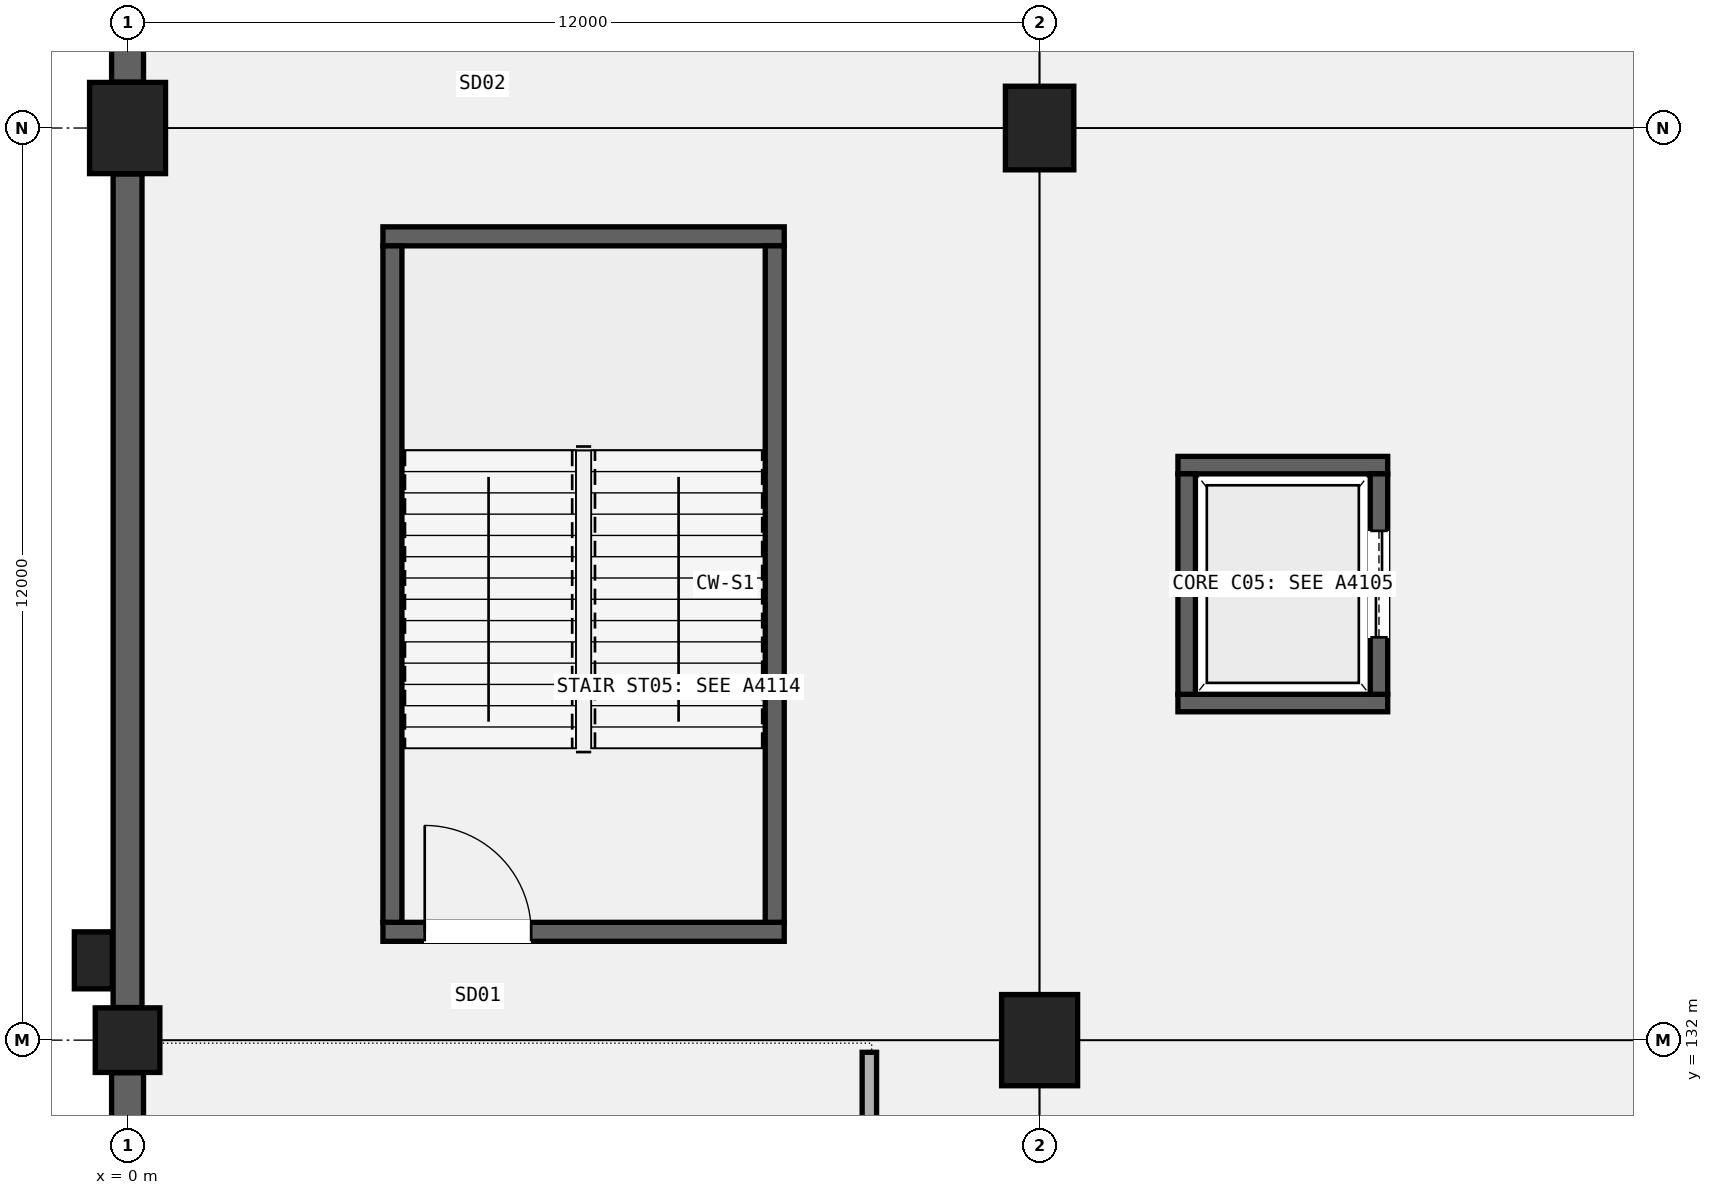
"""IFC4 building model, lengths in metres.
Left out: names, types, materials, properties, quantities, classifications, styles, units other than length and angle.
Written with IfcOpenShell. Run it as: python <this file> out.ifc"""

import sys

from ifc_helpers import new_model, si_unit, direction, frame, frame_2d, origin, origin_2d, place, context, subcontext, project, spatial, rectangle, circle, extrude, element, fill, save


model = new_model("IFC4")
c1 = context("Model", 3, precision=1e-05, world=origin(), true_north=direction((0.0, 1.0)))
c2 = subcontext(c1, "Body", "Model", "MODEL_VIEW")
j1 = project(units=[si_unit("LENGTHUNIT", "METRE"), si_unit("PLANEANGLEUNIT", "RADIAN")], contexts=[c1])
p1 = place(None, origin())
s1 = spatial("IfcSite", under=j1, at=p1, CompositionType="ELEMENT")
p2 = place(p1, origin())
s2 = spatial("IfcBuilding", under=s1, at=p2, CompositionType="ELEMENT")
p3 = place(p2, frame((0.0, 0.0, -4.8)))
s3 = spatial("IfcBuildingStorey", under=s2, at=p3, CompositionType="ELEMENT", Elevation=-4.8)
p4 = place(p3, frame((0.0, 132.0, 0.0), z_axis=(0.0, 0.0, 1.0), x_axis=(1.0, 0.0, 0.0)))
e1 = element("IfcColumn", 1, at=p4, inside=s3, PredefinedType="COLUMN", context=c2, shape_type="SweptSolid", body=[
    extrude(circle(Radius=0.425, at=origin_2d()), origin(), (0.0, 0.0, 1.0), 4.8),
])
for number, where, z_axis, x_axis in (
    (2, (0.0, 144.0, 0.0), (0.0, 0.0, 1.0), (1.0, 0.0, 0.0)),
    (3, (12.0, 132.0, 0.0), (0.0, 0.0, 1.0), (1.0, 0.0, 0.0)),
):
    element("IfcColumn", number, at=place(p3, frame(where, z_axis=z_axis, x_axis=x_axis)), inside=s3, PredefinedType="COLUMN", context=c2, shape_type="SweptSolid", body=[
        extrude(rectangle(XDim=1.0, YDim=1.2, at=origin_2d()), origin(), (0.0, 0.0, 1.0), 4.8),
    ])
p5 = place(p3, frame((12.0, 144.0, 0.0), z_axis=(0.0, 0.0, 1.0), x_axis=(1.0, 0.0, 0.0)))
e4 = element("IfcColumn", 4, at=p5, inside=s3, PredefinedType="COLUMN", context=c2, shape_type="SweptSolid", body=[
    extrude(rectangle(XDim=0.9, YDim=1.1, at=origin_2d()), origin(), (0.0, 0.0, 1.0), 4.8),
])
p6 = place(p3, frame((-0.45, 133.05, 0.0), z_axis=(0.0, 0.0, 1.0), x_axis=(1.0, 0.0, 0.0)))
e5 = element("IfcColumn", 5, at=p6, inside=s3, PredefinedType="PILASTER", context=c2, shape_type="SweptSolid", body=[
    extrude(rectangle(XDim=0.5, YDim=0.75, at=origin_2d()), origin(), (0.0, 0.0, 1.0), 4.8),
])
p7 = place(p3, frame((0.0, 120.504, 0.0), z_axis=(0.0, 0.0, 1.0), x_axis=(0.0, 1.0, 0.0)))
e6 = element("IfcWall", 6, at=p7, inside=s3, PredefinedType="STANDARD", context=c2, shape_type="SweptSolid", body=[
    extrude(rectangle(XDim=11.067, YDim=0.42, at=frame_2d((5.534, 0.0))), origin(), (0.0, 0.0, 1.0), 4.46),
])
p8 = place(p3, frame((0.0, 132.429, 0.0), z_axis=(0.0, 0.0, 1.0), x_axis=(0.0, 1.0, 0.0)))
e7 = element("IfcWall", 7, at=p8, inside=s3, PredefinedType="STANDARD", context=c2, shape_type="SweptSolid", body=[
    extrude(rectangle(XDim=10.967, YDim=0.38, at=frame_2d((5.483, 0.0))), origin(), (0.0, 0.0, 1.0), 4.46),
])
p9 = place(p3, frame((0.0, 144.604, 0.0), z_axis=(0.0, 0.0, 1.0), x_axis=(0.0, 1.0, 0.0)))
e8 = element("IfcWall", 8, at=p9, inside=s3, PredefinedType="STANDARD", context=c2, shape_type="SweptSolid", body=[
    extrude(rectangle(XDim=10.842, YDim=0.42, at=frame_2d((5.421, 0.0))), origin(), (0.0, 0.0, 1.0), 4.46),
])
p10 = place(p3, frame((3.36, 133.425, 0.0), z_axis=(0.0, 0.0, 1.0), x_axis=(1.0, 0.0, 0.0)))
e9 = element("IfcWall", 9, at=p10, inside=s3, PredefinedType="SHEAR", context=c2, shape_type="SweptSolid", body=[
    extrude(rectangle(XDim=5.28, YDim=0.25, at=frame_2d((2.64, 0.0))), origin(), (0.0, 0.0, 1.0), 4.5),
])
p11 = place(p10, frame((0.55, 0.0, 0.0)))
e10 = element("IfcOpeningElement", 10, at=p11, cuts=e9, PredefinedType="OPENING", context=c2, shape_type="SweptSolid", body=[
    extrude(rectangle(XDim=1.4, YDim=2.15, at=frame_2d((0.7, 1.075))), frame((0.0, 0.135, 0.0), z_axis=(0.0, -1.0, 0.0), x_axis=(1.0, 0.0, 0.0)), (0.0, 0.0, 1.0), 0.27),
])
p12 = place(p3, frame((3.36, 142.575, 0.0), z_axis=(0.0, 0.0, 1.0), x_axis=(1.0, 0.0, 0.0)))
e11 = element("IfcWall", 11, at=p12, inside=s3, PredefinedType="SHEAR", context=c2, shape_type="SweptSolid", body=[
    extrude(rectangle(XDim=5.28, YDim=0.25, at=frame_2d((2.64, 0.0))), origin(), (0.0, 0.0, 1.0), 4.5),
])
for number, where, z_axis, x_axis in (
    (12, (3.485, 133.55, 0.0), (0.0, 0.0, 1.0), (0.0, 1.0, 0.0)),
    (13, (8.515, 133.55, 0.0), (0.0, 0.0, 1.0), (0.0, 1.0, 0.0)),
):
    element("IfcWall", number, at=place(p3, frame(where, z_axis=z_axis, x_axis=x_axis)), inside=s3, PredefinedType="SHEAR", context=c2, shape_type="SweptSolid", body=[
        extrude(rectangle(XDim=8.9, YDim=0.25, at=frame_2d((4.45, 0.0))), origin(), (0.0, 0.0, 1.0), 4.5),
    ])
for number, where, z_axis, x_axis in (
    (14, (13.82, 136.435, -0.65), (0.0, 0.0, 1.0), (1.0, 0.0, 0.0)),
    (15, (13.82, 139.565, -0.65), (0.0, 0.0, 1.0), (1.0, 0.0, 0.0)),
):
    element("IfcWall", number, at=place(p3, frame(where, z_axis=z_axis, x_axis=x_axis)), inside=s3, PredefinedType="SHEAR", context=c2, shape_type="SweptSolid", body=[
        extrude(rectangle(XDim=2.76, YDim=0.23, at=frame_2d((1.38, 0.0))), origin(), (0.0, 0.0, 1.0), 4.5),
    ])
p13 = place(p3, frame((13.935, 136.55, -0.65), z_axis=(0.0, 0.0, 1.0), x_axis=(0.0, 1.0, 0.0)))
e16 = element("IfcWall", 16, at=p13, inside=s3, PredefinedType="SHEAR", context=c2, shape_type="SweptSolid", body=[
    extrude(rectangle(XDim=2.9, YDim=0.23, at=frame_2d((1.45, 0.0))), origin(), (0.0, 0.0, 1.0), 4.5),
])
p14 = place(p3, frame((16.465, 136.55, -0.65), z_axis=(0.0, 0.0, 1.0), x_axis=(0.0, 1.0, 0.0)))
e17 = element("IfcWall", 17, at=p14, inside=s3, PredefinedType="SHEAR", context=c2, shape_type="SweptSolid", body=[
    extrude(rectangle(XDim=2.9, YDim=0.23, at=frame_2d((1.45, 0.0))), origin(), (0.0, 0.0, 1.0), 4.5),
])
p15 = place(p14, frame((0.75, 0.0, 0.65)))
e18 = element("IfcOpeningElement", 18, at=p15, cuts=e17, PredefinedType="OPENING", context=c2, shape_type="SweptSolid", body=[
    extrude(rectangle(XDim=1.4, YDim=2.25, at=frame_2d((0.7, 1.125))), frame((0.0, 0.125, 0.0), z_axis=(0.0, -1.0, 0.0), x_axis=(1.0, 0.0, 0.0)), (0.0, 0.0, 1.0), 0.25),
])
p16 = place(p3, frame((9.76, 120.16, 0.0), z_axis=(0.0, 0.0, 1.0), x_axis=(0.0, 1.0, 0.0)))
e19 = element("IfcWall", 19, at=p16, inside=s3, PredefinedType="PARTITIONING", context=c2, shape_type="SweptSolid", body=[
    extrude(rectangle(XDim=11.68, YDim=0.19, at=frame_2d((5.84, 0.0))), origin(), (0.0, 0.0, 1.0), 3.92),
])
p17 = place(p16, frame((1.347, 0.0, 0.0)))
e20 = element("IfcOpeningElement", 20, at=p17, cuts=e19, PredefinedType="OPENING", context=c2, shape_type="SweptSolid", body=[
    extrude(rectangle(XDim=1.15, YDim=2.15, at=frame_2d((0.575, 1.075))), frame((0.0, 0.105, 0.0), z_axis=(0.0, -1.0, 0.0), x_axis=(1.0, 0.0, 0.0)), (0.0, 0.0, 1.0), 0.21),
])
p18 = place(p16, frame((7.252, 0.0, 0.0)))
e21 = element("IfcOpeningElement", 21, at=p18, cuts=e19, PredefinedType="OPENING", context=c2, shape_type="SweptSolid", body=[
    extrude(rectangle(XDim=1.18, YDim=2.2, at=frame_2d((0.59, 1.1))), frame((0.0, 0.105, 0.0), z_axis=(0.0, -1.0, 0.0), x_axis=(1.0, 0.0, 0.0)), (0.0, 0.0, 1.0), 0.21),
])
p19 = place(p11, origin())
e22 = element("IfcDoor", 22, at=p19, inside=s3, OperationType="SINGLE_SWING_LEFT", PredefinedType="DOOR", context=c2, shape_type="SweptSolid", body=[
    extrude(rectangle(XDim=1.4, YDim=2.15, at=frame_2d((0.7, 1.075))), frame((0.0, 0.025, 0.0), z_axis=(0.0, -1.0, 0.0), x_axis=(1.0, 0.0, 0.0)), (0.0, 0.0, 1.0), 0.05),
])
fill(e10, e22)
p20 = place(p15, origin())
e23 = element("IfcDoor", 23, at=p20, inside=s3, OperationType="DOUBLE_DOOR_SLIDING", PredefinedType="DOOR", context=c2, shape_type="SweptSolid", body=[
    extrude(rectangle(XDim=1.4, YDim=2.25, at=frame_2d((0.7, 1.125))), frame((0.0, 0.025, 0.0), z_axis=(0.0, -1.0, 0.0), x_axis=(1.0, 0.0, 0.0)), (0.0, 0.0, 1.0), 0.05),
])
fill(e18, e23)
save(model, sys.argv[1])
